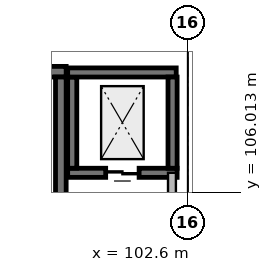
"""IFC4 building model, lengths in metres.
Left out: names, types, materials, properties, quantities, classifications, styles, units other than length and angle.
Written with IfcOpenShell. Run it as: python <this file> out.ifc"""

import sys

from ifc_helpers import new_model, si_unit, direction, frame, frame_2d, origin, place, context, subcontext, project, spatial, rectangle, extrude, element, fill, save


model = new_model("IFC4")
c1 = context("Model", 3, precision=1e-05, world=origin(), true_north=direction((0.0, 1.0)))
c2 = subcontext(c1, "Body", "Model", "MODEL_VIEW")
j1 = project(units=[si_unit("LENGTHUNIT", "METRE"), si_unit("PLANEANGLEUNIT", "RADIAN")], contexts=[c1])
p1 = place(None, origin())
s1 = spatial("IfcSite", under=j1, at=p1, CompositionType="ELEMENT")
p2 = place(p1, origin())
s2 = spatial("IfcBuilding", under=s1, at=p2, CompositionType="ELEMENT")
p3 = place(p2, frame((0.0, 0.0, -4.8)))
s3 = spatial("IfcBuildingStorey", under=s2, at=p3, CompositionType="ELEMENT", Elevation=-4.8)
p4 = place(p3, frame((94.45, 109.975, 0.0), z_axis=(0.0, 0.0, 1.0), x_axis=(1.0, 0.0, 0.0)))
e1 = element("IfcWall", 1, at=p4, inside=s3, PredefinedType="SOLIDWALL", context=c2, shape_type="SweptSolid", body=[
    extrude(rectangle(XDim=4.15, YDim=0.35, at=frame_2d((2.075, 0.0))), origin(), (0.0, 0.0, 1.0), 4.48),
])
p5 = place(p3, frame((98.425, 109.8, 0.0), z_axis=(0.0, 0.0, 1.0), x_axis=(0.0, -1.0, 0.0)))
e2 = element("IfcWall", 2, at=p5, inside=s3, PredefinedType="SOLIDWALL", context=c2, shape_type="SweptSolid", body=[
    extrude(rectangle(XDim=7.8, YDim=0.35, at=frame_2d((3.9, 0.0))), origin(), (0.0, 0.0, 1.0), 4.48),
])
p6 = place(p3, frame((102.25, 106.65, 0.0), z_axis=(0.0, 0.0, 1.0), x_axis=(-1.0, 0.0, 0.0)))
e3 = element("IfcWall", 3, at=p6, inside=s3, PredefinedType="SOLIDWALL", context=c2, shape_type="SweptSolid", body=[
    extrude(rectangle(XDim=3.6, YDim=0.3, at=frame_2d((1.8, 0.0))), origin(), (0.0, 0.0, 1.0), 4.8),
])
p7 = place(p6, frame((1.25, 0.0, 0.0)))
e4 = element("IfcOpeningElement", 4, at=p7, cuts=e3, PredefinedType="OPENING", context=c2, shape_type="SweptSolid", body=[
    extrude(rectangle(XDim=1.1, YDim=2.1, at=frame_2d((0.55, 1.05))), frame((0.0, 0.17, 0.0), z_axis=(0.0, -1.0, 0.0), x_axis=(1.0, 0.0, 0.0)), (0.0, 0.0, 1.0), 0.34),
])
p8 = place(p3, frame((98.8, 106.8, 0.0), z_axis=(0.0, 0.0, 1.0), x_axis=(0.0, 1.0, 0.0)))
e5 = element("IfcWall", 5, at=p8, inside=s3, PredefinedType="SOLIDWALL", context=c2, shape_type="SweptSolid", body=[
    extrude(rectangle(XDim=3.0, YDim=0.3, at=frame_2d((1.5, 0.0))), origin(), (0.0, 0.0, 1.0), 4.8),
])
p9 = place(p3, frame((98.65, 109.95, 0.0), z_axis=(0.0, 0.0, 1.0), x_axis=(1.0, 0.0, 0.0)))
e6 = element("IfcWall", 6, at=p9, inside=s3, PredefinedType="SOLIDWALL", context=c2, shape_type="SweptSolid", body=[
    extrude(rectangle(XDim=3.57, YDim=0.3, at=frame_2d((1.785, 0.0))), origin(), (0.0, 0.0, 1.0), 4.8),
])
p10 = place(p3, frame((102.1, 109.8, 0.0), z_axis=(0.0, 0.0, 1.0), x_axis=(0.0, -1.0, 0.0)))
e7 = element("IfcWall", 7, at=p10, inside=s3, PredefinedType="SOLIDWALL", context=c2, shape_type="SweptSolid", body=[
    extrude(rectangle(XDim=3.0, YDim=0.3, at=frame_2d((1.5, 0.0))), origin(), (0.0, 0.0, 1.0), 4.8),
])
p11 = place(p3, frame((102.08, 106.65, 0.0), z_axis=(0.0, 0.0, 1.0), x_axis=(0.0, -1.0, 0.0)))
e8 = element("IfcWall", 8, at=p11, inside=s3, PredefinedType="SOLIDWALL", context=c2, shape_type="SweptSolid", body=[
    extrude(rectangle(XDim=5.85, YDim=0.26, at=frame_2d((2.925, 0.0))), origin(), (0.0, 0.0, 1.0), 4.48),
])
p12 = place(p7, origin())
e9 = element("IfcDoor", 9, at=p12, inside=s3, OperationType="DOUBLE_DOOR_SLIDING", PredefinedType="DOOR", context=c2, shape_type="SweptSolid", body=[
    extrude(rectangle(XDim=1.1, YDim=2.1, at=frame_2d((0.55, 1.05))), frame((0.0, 0.025, 0.0), z_axis=(0.0, -1.0, 0.0), x_axis=(1.0, 0.0, 0.0)), (0.0, 0.0, 1.0), 0.05),
])
fill(e4, e9)
save(model, sys.argv[1])
